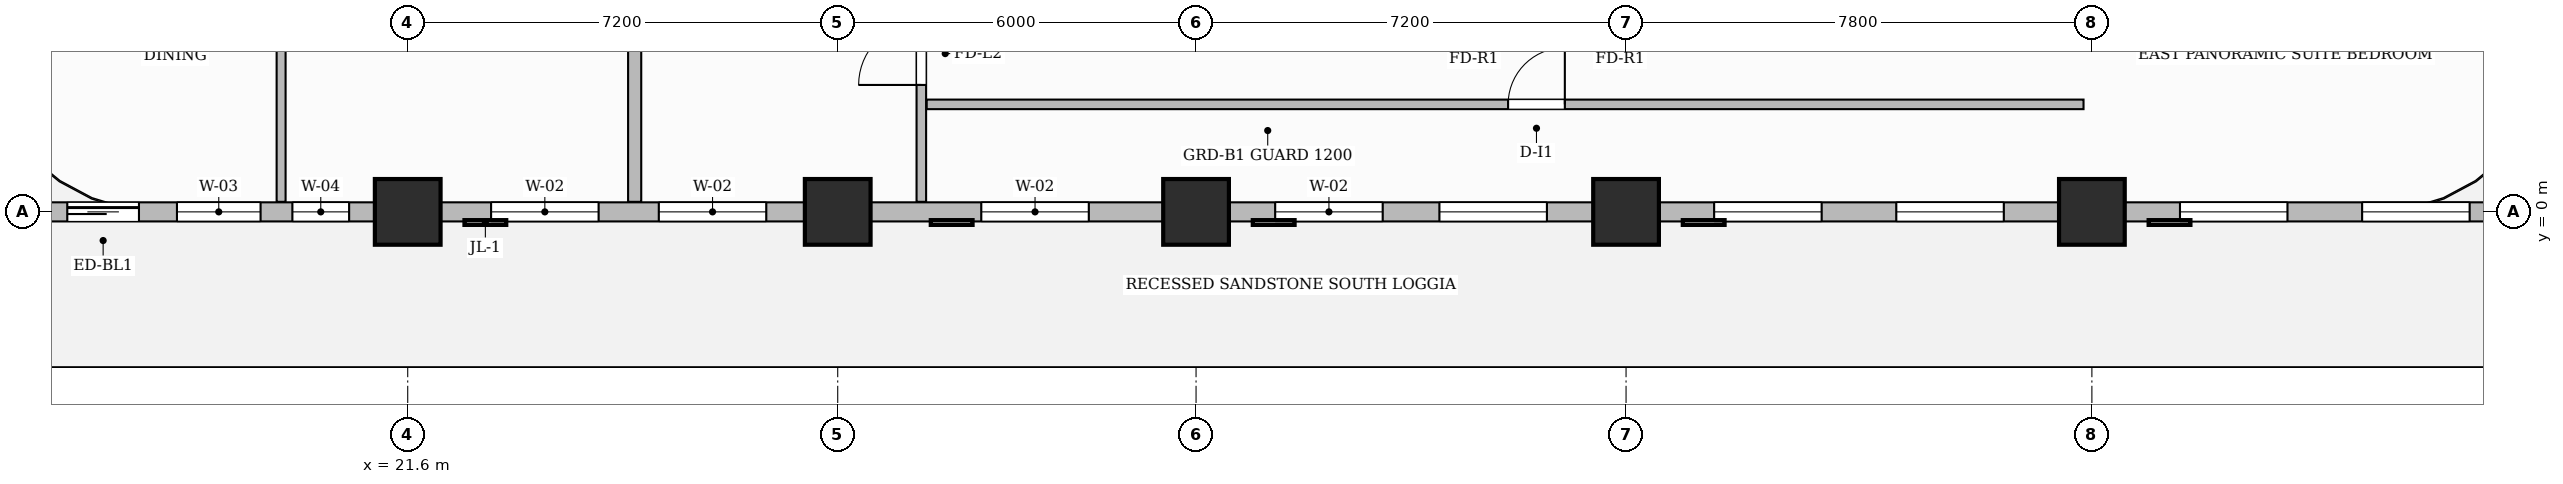
"""IFC4 building model, lengths in metres.
Left out: names, types, materials, properties, quantities, classifications, styles, units other than length and angle.
Written with IfcOpenShell. Run it as: python <this file> out.ifc"""

import sys

from ifc_helpers import new_model, si_unit, direction, frame, frame_2d, origin, origin_2d, place, context, subcontext, project, spatial, rectangle, extrude, source, transform, mapped, element, fill, save


model = new_model("IFC4")
c1 = context("Model", 3, precision=1e-05, world=origin(), true_north=direction((0.0, 1.0)))
c2 = subcontext(c1, "Body", "Model", "MODEL_VIEW")
j1 = project(units=[si_unit("LENGTHUNIT", "METRE"), si_unit("PLANEANGLEUNIT", "RADIAN")], contexts=[c1])
p1 = place(None, origin())
s1 = spatial("IfcSite", under=j1, at=p1, CompositionType="ELEMENT")
p2 = place(p1, origin())
s2 = spatial("IfcBuilding", under=s1, at=p2, CompositionType="ELEMENT")
p3 = place(p2, frame((0.0, 0.0, 62.0)))
s3 = spatial("IfcBuildingStorey", under=s2, at=p3, CompositionType="ELEMENT", Elevation=62.0)
m1 = source(origin(), c2, "Body", "SweptSolid", [
    extrude(rectangle(XDim=1.1, YDim=1.1, at=origin_2d()), origin(), (0.0, 0.0, 1.0), 3.7),
])
for number, where, z_axis, x_axis in (
    (1, (21.6, 0.0, 0.0), (0.0, 0.0, 1.0), (1.0, 0.0, 0.0)),
    (2, (28.8, 0.0, 0.0), (0.0, 0.0, 1.0), (1.0, 0.0, 0.0)),
    (3, (34.8, 0.0, 0.0), (0.0, 0.0, 1.0), (1.0, 0.0, 0.0)),
    (4, (42.0, 0.0, 0.0), (0.0, 0.0, 1.0), (1.0, 0.0, 0.0)),
    (5, (49.8, 0.0, 0.0), (0.0, 0.0, 1.0), (1.0, 0.0, 0.0)),
):
    element("IfcColumn", number, at=place(p3, frame(where, z_axis=z_axis, x_axis=x_axis)), inside=s3, PredefinedType="COLUMN", context=c2, shape_type="MappedRepresentation", body=[
        mapped(m1, transform((0.0, 0.0, 0.0), scale=1.0)),
    ])
p4 = place(p3, frame((30.2, 0.168, 0.0), z_axis=(0.0, 0.0, 1.0), x_axis=(0.0, 1.0, 0.0)))
e6 = element("IfcWall", 6, at=p4, inside=s3, PredefinedType="PARTITIONING", context=c2, shape_type="SweptSolid", body=[
    extrude(rectangle(XDim=9.292, YDim=0.16, at=frame_2d((4.646, 0.0))), origin(), (0.0, 0.0, 1.0), 3.45),
])
p5 = place(p4, frame((1.957, 0.0, 0.0)))
e7 = element("IfcOpeningElement", 7, at=p5, cuts=e6, PredefinedType="OPENING", context=c2, shape_type="SweptSolid", body=[
    extrude(rectangle(XDim=1.05, YDim=2.15, at=frame_2d((0.525, 1.075))), frame((0.0, 0.09, 0.0), z_axis=(0.0, -1.0, 0.0), x_axis=(1.0, 0.0, 0.0)), (0.0, 0.0, 1.0), 0.18),
])
p6 = place(p3, frame((30.29, 1.8, 0.0), z_axis=(0.0, 0.0, 1.0), x_axis=(1.0, 0.0, 0.0)))
e8 = element("IfcWall", 8, at=p6, inside=s3, PredefinedType="PARTITIONING", context=c2, shape_type="SweptSolid", body=[
    extrude(rectangle(XDim=19.37, YDim=0.16, at=frame_2d((9.685, 0.0))), origin(), (0.0, 0.0, 1.0), 3.45),
])
p7 = place(p6, frame((9.735, 0.0, 0.0)))
e9 = element("IfcOpeningElement", 9, at=p7, cuts=e8, PredefinedType="OPENING", context=c2, shape_type="SweptSolid", body=[
    extrude(rectangle(XDim=0.95, YDim=2.15, at=frame_2d((0.475, 1.075))), frame((0.0, 0.09, 0.0), z_axis=(0.0, -1.0, 0.0), x_axis=(1.0, 0.0, 0.0)), (0.0, 0.0, 1.0), 0.18),
])
p8 = place(p3, frame((25.4, 0.168, 0.0), z_axis=(0.0, 0.0, 1.0), x_axis=(0.0, 1.0, 0.0)))
e10 = element("IfcWall", 10, at=p8, inside=s3, PredefinedType="PARTITIONING", context=c2, shape_type="SweptSolid", body=[
    extrude(rectangle(XDim=9.292, YDim=0.22, at=frame_2d((4.646, 0.0))), origin(), (0.0, 0.0, 1.0), 3.035),
])
p9 = place(p3, frame((19.48, 0.168, 0.0), z_axis=(0.0, 0.0, 1.0), x_axis=(0.0, 1.0, 0.0)))
e11 = element("IfcWall", 11, at=p9, inside=s3, PredefinedType="PARTITIONING", context=c2, shape_type="SweptSolid", body=[
    extrude(rectangle(XDim=9.292, YDim=0.15, at=frame_2d((4.646, 0.0))), origin(), (0.0, 0.0, 1.0), 3.45),
])
p10 = place(p9, frame((7.857, 0.0, 0.0)))
e12 = element("IfcOpeningElement", 12, at=p10, cuts=e11, PredefinedType="OPENING", context=c2, shape_type="SweptSolid", body=[
    extrude(rectangle(XDim=0.9, YDim=2.15, at=frame_2d((0.45, 1.075))), frame((0.0, 0.085, 0.0), z_axis=(0.0, -1.0, 0.0), x_axis=(1.0, 0.0, 0.0)), (0.0, 0.0, 1.0), 0.17),
])
p11 = place(p3, frame((14.4, 0.0, 0.0), z_axis=(0.0, 0.0, 1.0), x_axis=(1.0, 0.0, 0.0)))
e13 = element("IfcWall", 13, at=p11, inside=s3, PredefinedType="SOLIDWALL", context=c2, shape_type="SweptSolid", body=[
    extrude(rectangle(XDim=43.2, YDim=0.32, at=frame_2d((21.6, 0.0))), origin(), (0.0, 0.0, 1.0), 2.885),
])
p12 = place(p11, frame((1.5, 0.0, 0.0)))
e14 = element("IfcOpeningElement", 14, at=p12, cuts=e13, PredefinedType="OPENING", context=c2, shape_type="SweptSolid", body=[
    extrude(rectangle(XDim=1.2, YDim=2.2, at=frame_2d((0.6, 1.1))), frame((0.0, 0.17, 0.0), z_axis=(0.0, -1.0, 0.0), x_axis=(1.0, 0.0, 0.0)), (0.0, 0.0, 1.0), 0.34),
])
p13 = place(p11, frame((3.336, 0.0, 0.8)))
e15 = element("IfcOpeningElement", 15, at=p13, cuts=e13, PredefinedType="OPENING", context=c2, shape_type="SweptSolid", body=[
    extrude(rectangle(XDim=1.4, YDim=1.85, at=frame_2d((0.7, 0.925))), frame((0.0, 0.17, 0.0), z_axis=(0.0, -1.0, 0.0), x_axis=(1.0, 0.0, 0.0)), (0.0, 0.0, 1.0), 0.34),
])
p14 = place(p11, frame((5.269, 0.0, 0.8)))
e16 = element("IfcOpeningElement", 16, at=p14, cuts=e13, PredefinedType="OPENING", context=c2, shape_type="SweptSolid", body=[
    extrude(rectangle(XDim=0.95, YDim=1.75, at=frame_2d((0.475, 0.875))), frame((0.0, 0.17, 0.0), z_axis=(0.0, -1.0, 0.0), x_axis=(1.0, 0.0, 0.0)), (0.0, 0.0, 1.0), 0.34),
])
p15 = place(p11, frame((8.596, 0.0, 0.8)))
e17 = element("IfcOpeningElement", 17, at=p15, cuts=e13, PredefinedType="OPENING", context=c2, shape_type="SweptSolid", body=[
    extrude(rectangle(XDim=1.8, YDim=1.85, at=frame_2d((0.9, 0.925))), frame((0.0, 0.17, 0.0), z_axis=(0.0, -1.0, 0.0), x_axis=(1.0, 0.0, 0.0)), (0.0, 0.0, 1.0), 0.34),
])
p16 = place(p11, frame((11.404, 0.0, 0.8)))
e18 = element("IfcOpeningElement", 18, at=p16, cuts=e13, PredefinedType="OPENING", context=c2, shape_type="SweptSolid", body=[
    extrude(rectangle(XDim=1.8, YDim=1.85, at=frame_2d((0.9, 0.925))), frame((0.0, 0.17, 0.0), z_axis=(0.0, -1.0, 0.0), x_axis=(1.0, 0.0, 0.0)), (0.0, 0.0, 1.0), 0.34),
])
p17 = place(p11, frame((16.804, 0.0, 0.8)))
e19 = element("IfcOpeningElement", 19, at=p17, cuts=e13, PredefinedType="OPENING", context=c2, shape_type="SweptSolid", body=[
    extrude(rectangle(XDim=1.8, YDim=1.85, at=frame_2d((0.9, 0.925))), frame((0.0, 0.17, 0.0), z_axis=(0.0, -1.0, 0.0), x_axis=(1.0, 0.0, 0.0)), (0.0, 0.0, 1.0), 0.34),
])
p18 = place(p11, frame((21.725, 0.0, 0.8)))
e20 = element("IfcOpeningElement", 20, at=p18, cuts=e13, PredefinedType="OPENING", context=c2, shape_type="SweptSolid", body=[
    extrude(rectangle(XDim=1.8, YDim=1.85, at=frame_2d((0.9, 0.925))), frame((0.0, 0.17, 0.0), z_axis=(0.0, -1.0, 0.0), x_axis=(1.0, 0.0, 0.0)), (0.0, 0.0, 1.0), 0.34),
])
p19 = place(p11, frame((24.475, 0.0, 0.8)))
e21 = element("IfcOpeningElement", 21, at=p19, cuts=e13, PredefinedType="OPENING", context=c2, shape_type="SweptSolid", body=[
    extrude(rectangle(XDim=1.8, YDim=1.85, at=frame_2d((0.9, 0.925))), frame((0.0, 0.17, 0.0), z_axis=(0.0, -1.0, 0.0), x_axis=(1.0, 0.0, 0.0)), (0.0, 0.0, 1.0), 0.34),
])
p20 = place(p11, frame((29.075, 0.0, 0.8)))
e22 = element("IfcOpeningElement", 22, at=p20, cuts=e13, PredefinedType="OPENING", context=c2, shape_type="SweptSolid", body=[
    extrude(rectangle(XDim=1.8, YDim=1.85, at=frame_2d((0.9, 0.925))), frame((0.0, 0.17, 0.0), z_axis=(0.0, -1.0, 0.0), x_axis=(1.0, 0.0, 0.0)), (0.0, 0.0, 1.0), 0.34),
])
p21 = place(p11, frame((32.125, 0.0, 0.8)))
e23 = element("IfcOpeningElement", 23, at=p21, cuts=e13, PredefinedType="OPENING", context=c2, shape_type="SweptSolid", body=[
    extrude(rectangle(XDim=1.8, YDim=1.85, at=frame_2d((0.9, 0.925))), frame((0.0, 0.17, 0.0), z_axis=(0.0, -1.0, 0.0), x_axis=(1.0, 0.0, 0.0)), (0.0, 0.0, 1.0), 0.34),
])
p22 = place(p11, frame((36.875, 0.0, 0.8)))
e24 = element("IfcOpeningElement", 24, at=p22, cuts=e13, PredefinedType="OPENING", context=c2, shape_type="SweptSolid", body=[
    extrude(rectangle(XDim=1.8, YDim=1.85, at=frame_2d((0.9, 0.925))), frame((0.0, 0.17, 0.0), z_axis=(0.0, -1.0, 0.0), x_axis=(1.0, 0.0, 0.0)), (0.0, 0.0, 1.0), 0.34),
])
p23 = place(p11, frame((39.925, 0.0, 0.8)))
e25 = element("IfcOpeningElement", 25, at=p23, cuts=e13, PredefinedType="OPENING", context=c2, shape_type="SweptSolid", body=[
    extrude(rectangle(XDim=1.8, YDim=1.85, at=frame_2d((0.9, 0.925))), frame((0.0, 0.17, 0.0), z_axis=(0.0, -1.0, 0.0), x_axis=(1.0, 0.0, 0.0)), (0.0, 0.0, 1.0), 0.34),
])
m2 = source(origin(), c2, "Body", "SweptSolid", [
    extrude(rectangle(XDim=1.05, YDim=2.15, at=frame_2d((0.525, 1.075))), frame((0.0, 0.025, 0.0), z_axis=(0.0, -1.0, 0.0), x_axis=(1.0, 0.0, 0.0)), (0.0, 0.0, 1.0), 0.05),
])
p24 = place(p5, origin())
e26 = element("IfcDoor", 26, at=p24, inside=s3, OperationType="SINGLE_SWING_LEFT", PredefinedType="DOOR", context=c2, shape_type="MappedRepresentation", body=[
    mapped(m2, transform((0.0, 0.0, 0.0), scale=1.0)),
])
fill(e7, e26)
m3 = source(origin(), c2, "Body", "SweptSolid", [
    extrude(rectangle(XDim=0.95, YDim=2.15, at=frame_2d((0.475, 1.075))), frame((0.0, 0.025, 0.0), z_axis=(0.0, -1.0, 0.0), x_axis=(1.0, 0.0, 0.0)), (0.0, 0.0, 1.0), 0.05),
])
p25 = place(p7, origin())
e27 = element("IfcDoor", 27, at=p25, inside=s3, OperationType="SINGLE_SWING_RIGHT", PredefinedType="DOOR", context=c2, shape_type="MappedRepresentation", body=[
    mapped(m3, transform((0.0, 0.0, 0.0), scale=1.0)),
])
fill(e9, e27)
m4 = source(origin(), c2, "Body", "SweptSolid", [
    extrude(rectangle(XDim=1.2, YDim=2.2, at=frame_2d((0.6, 1.1))), frame((0.0, 0.025, 0.0), z_axis=(0.0, -1.0, 0.0), x_axis=(1.0, 0.0, 0.0)), (0.0, 0.0, 1.0), 0.05),
])
p26 = place(p12, origin())
e28 = element("IfcDoor", 28, at=p26, inside=s3, OperationType="SLIDING_TO_LEFT", PredefinedType="DOOR", context=c2, shape_type="MappedRepresentation", body=[
    mapped(m4, transform((0.0, 0.0, 0.0), scale=1.0)),
])
fill(e14, e28)
m5 = source(origin(), c2, "Body", "SweptSolid", [
    extrude(rectangle(XDim=1.4, YDim=1.85, at=frame_2d((0.7, 0.925))), frame((0.0, 0.03, 0.0), z_axis=(0.0, -1.0, 0.0), x_axis=(1.0, 0.0, 0.0)), (0.0, 0.0, 1.0), 0.06),
])
p27 = place(p13, origin())
e29 = element("IfcWindow", 29, at=p27, inside=s3, PartitioningType="SINGLE_PANEL", PredefinedType="WINDOW", context=c2, shape_type="MappedRepresentation", body=[
    mapped(m5, transform((0.0, 0.0, 0.0), scale=1.0)),
])
fill(e15, e29)
m6 = source(origin(), c2, "Body", "SweptSolid", [
    extrude(rectangle(XDim=0.95, YDim=1.75, at=frame_2d((0.475, 0.875))), frame((0.0, 0.03, 0.0), z_axis=(0.0, -1.0, 0.0), x_axis=(1.0, 0.0, 0.0)), (0.0, 0.0, 1.0), 0.06),
])
p28 = place(p14, origin())
e30 = element("IfcWindow", 30, at=p28, inside=s3, PartitioningType="SINGLE_PANEL", PredefinedType="WINDOW", context=c2, shape_type="MappedRepresentation", body=[
    mapped(m6, transform((0.0, 0.0, 0.0), scale=1.0)),
])
fill(e16, e30)
m7 = source(origin(), c2, "Body", "SweptSolid", [
    extrude(rectangle(XDim=1.8, YDim=1.85, at=frame_2d((0.9, 0.925))), frame((0.0, 0.03, 0.0), z_axis=(0.0, -1.0, 0.0), x_axis=(1.0, 0.0, 0.0)), (0.0, 0.0, 1.0), 0.06),
])
p29 = place(p15, origin())
e31 = element("IfcWindow", 31, at=p29, inside=s3, PartitioningType="DOUBLE_PANEL_VERTICAL", PredefinedType="WINDOW", context=c2, shape_type="MappedRepresentation", body=[
    mapped(m7, transform((0.0, 0.0, 0.0), scale=1.0)),
])
fill(e17, e31)
p30 = place(p16, origin())
e32 = element("IfcWindow", 32, at=p30, inside=s3, PartitioningType="DOUBLE_PANEL_VERTICAL", PredefinedType="WINDOW", context=c2, shape_type="MappedRepresentation", body=[
    mapped(m7, transform((0.0, 0.0, 0.0), scale=1.0)),
])
fill(e18, e32)
p31 = place(p17, origin())
e33 = element("IfcWindow", 33, at=p31, inside=s3, PartitioningType="DOUBLE_PANEL_VERTICAL", PredefinedType="WINDOW", context=c2, shape_type="MappedRepresentation", body=[
    mapped(m7, transform((0.0, 0.0, 0.0), scale=1.0)),
])
fill(e19, e33)
p32 = place(p18, origin())
e34 = element("IfcWindow", 34, at=p32, inside=s3, PartitioningType="DOUBLE_PANEL_VERTICAL", PredefinedType="WINDOW", context=c2, shape_type="MappedRepresentation", body=[
    mapped(m7, transform((0.0, 0.0, 0.0), scale=1.0)),
])
fill(e20, e34)
p33 = place(p19, origin())
e35 = element("IfcWindow", 35, at=p33, inside=s3, PartitioningType="DOUBLE_PANEL_VERTICAL", PredefinedType="WINDOW", context=c2, shape_type="MappedRepresentation", body=[
    mapped(m7, transform((0.0, 0.0, 0.0), scale=1.0)),
])
fill(e21, e35)
p34 = place(p20, origin())
e36 = element("IfcWindow", 36, at=p34, inside=s3, PartitioningType="DOUBLE_PANEL_VERTICAL", PredefinedType="WINDOW", context=c2, shape_type="MappedRepresentation", body=[
    mapped(m7, transform((0.0, 0.0, 0.0), scale=1.0)),
])
fill(e22, e36)
p35 = place(p21, origin())
e37 = element("IfcWindow", 37, at=p35, inside=s3, PartitioningType="DOUBLE_PANEL_VERTICAL", PredefinedType="WINDOW", context=c2, shape_type="MappedRepresentation", body=[
    mapped(m7, transform((0.0, 0.0, 0.0), scale=1.0)),
])
fill(e23, e37)
p36 = place(p22, origin())
e38 = element("IfcWindow", 38, at=p36, inside=s3, PartitioningType="DOUBLE_PANEL_VERTICAL", PredefinedType="WINDOW", context=c2, shape_type="MappedRepresentation", body=[
    mapped(m7, transform((0.0, 0.0, 0.0), scale=1.0)),
])
fill(e24, e38)
p37 = place(p23, origin())
e39 = element("IfcWindow", 39, at=p37, inside=s3, PartitioningType="DOUBLE_PANEL_VERTICAL", PredefinedType="WINDOW", context=c2, shape_type="MappedRepresentation", body=[
    mapped(m7, transform((0.0, 0.0, 0.0), scale=1.0)),
])
fill(e25, e39)
save(model, sys.argv[1])
